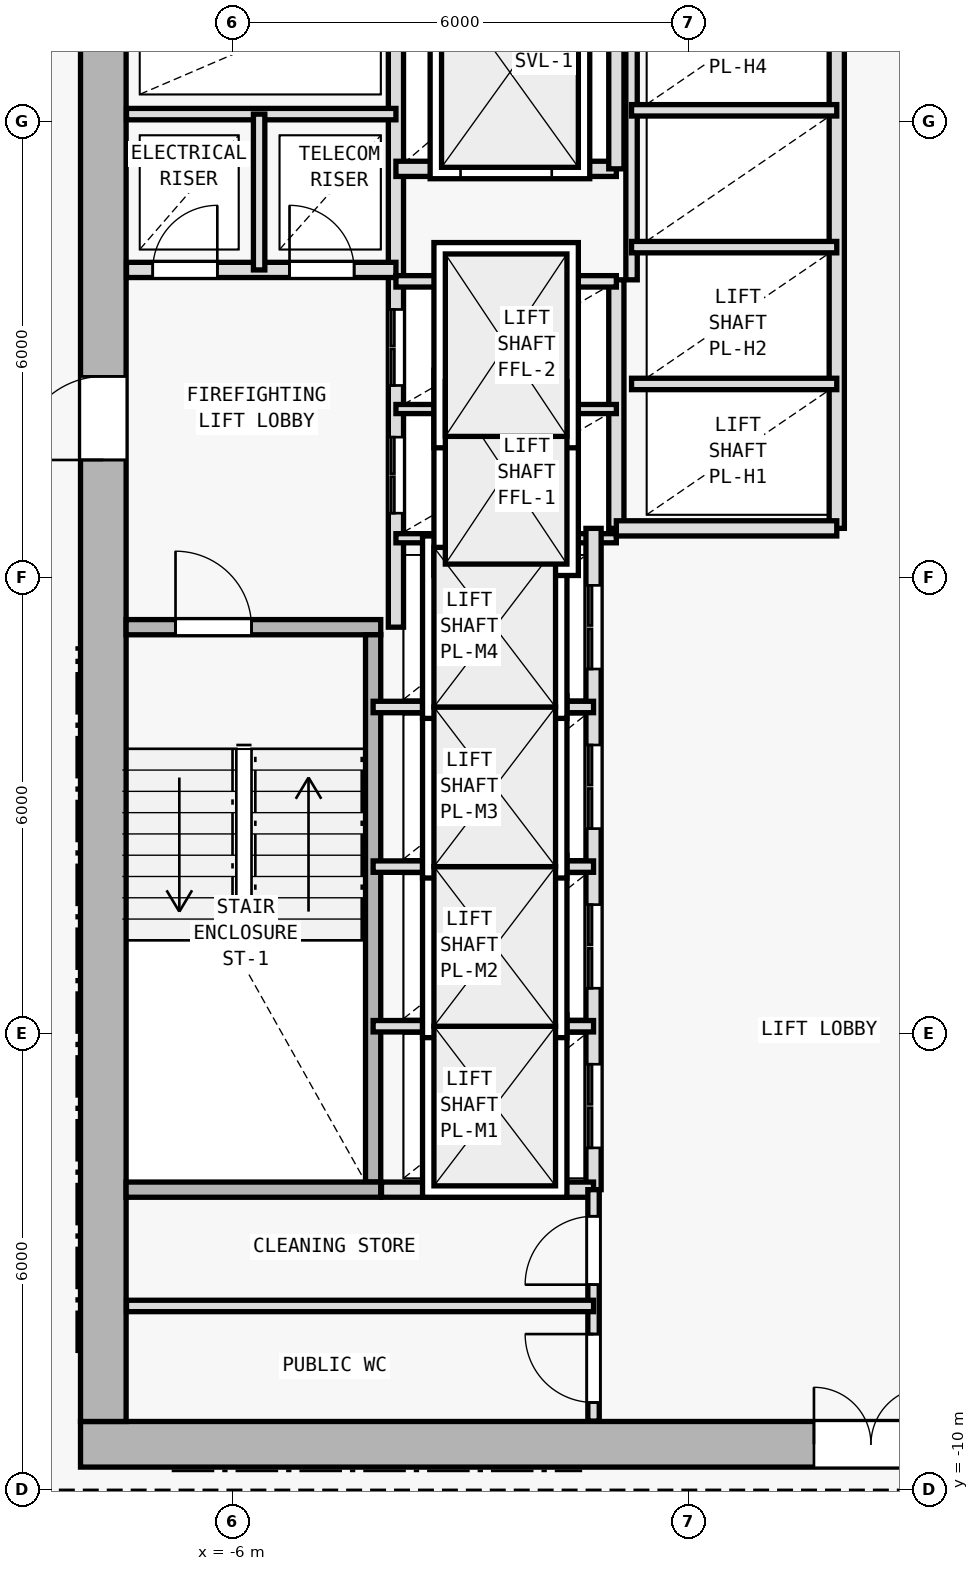
"""IFC4 building model, lengths in metres.
Left out: names, types, materials, properties, quantities, classifications, styles, units other than length and angle.
Written with IfcOpenShell. Run it as: python <this file> out.ifc"""

import sys

from ifc_helpers import new_model, si_unit, direction, frame, frame_2d, origin, origin_2d, place, context, subcontext, project, spatial, rectangle, i_section, extrude, element, fill, save


model = new_model("IFC4")
c1 = context("Model", 3, precision=1e-05, world=origin(), true_north=direction((0.0, 1.0)))
c2 = subcontext(c1, "Body", "Model", "MODEL_VIEW")
j1 = project(units=[si_unit("LENGTHUNIT", "METRE"), si_unit("PLANEANGLEUNIT", "RADIAN")], contexts=[c1])
p1 = place(None, origin())
s1 = spatial("IfcSite", under=j1, at=p1, CompositionType="ELEMENT")
p2 = place(p1, origin())
s2 = spatial("IfcBuilding", under=s1, at=p2, CompositionType="ELEMENT")
p3 = place(p2, frame((0.0, 0.0, 118.5)))
s3 = spatial("IfcBuildingStorey", under=s2, at=p3, CompositionType="ELEMENT", Elevation=118.5)
for number, where, z_axis, x_axis in (
    (1, (-7.7, -9.4, 0.0), (0.0, 0.0, 1.0), (1.0, 0.0, 0.0)),
    (2, (0.0, -9.4, 0.0), (0.0, 0.0, 1.0), (1.0, 0.0, 0.0)),
    (3, (-7.7, 2.0, 0.0), (0.0, 0.0, 1.0), (1.0, 0.0, 0.0)),
):
    element("IfcColumn", number, at=place(p3, frame(where, z_axis=z_axis, x_axis=x_axis)), inside=s3, PredefinedType="COLUMN", context=c2, shape_type="SweptSolid", body=[
        extrude(i_section(OverallWidth=0.409, OverallDepth=0.425, WebThickness=0.021, FlangeThickness=0.034, FilletRadius=0.015, at=origin_2d()), origin(), (0.0, 0.0, 1.0), 3.6),
    ])
p4 = place(p3, frame((-8.0, -9.4, 0.0), z_axis=(0.0, 0.0, 1.0), x_axis=(1.0, 0.0, 0.0)))
e4 = element("IfcWall", 4, at=p4, inside=s3, PredefinedType="SHEAR", context=c2, shape_type="SweptSolid", body=[
    extrude(rectangle(XDim=16.0, YDim=0.6, at=frame_2d((8.0, 0.0))), origin(), (0.0, 0.0, 1.0), 3.35),
])
p5 = place(p4, frame((9.65, 0.0, 0.0)))
e5 = element("IfcOpeningElement", 5, at=p5, cuts=e4, PredefinedType="OPENING", context=c2, shape_type="SweptSolid", body=[
    extrude(rectangle(XDim=1.5, YDim=2.2, at=frame_2d((0.75, 1.1))), frame((0.0, 0.31, 0.0), z_axis=(0.0, -1.0, 0.0), x_axis=(1.0, 0.0, 0.0)), (0.0, 0.0, 1.0), 0.62),
])
p6 = place(p3, frame((-7.7, -9.1, 0.0), z_axis=(0.0, 0.0, 1.0), x_axis=(0.0, 1.0, 0.0)))
e6 = element("IfcWall", 6, at=p6, inside=s3, PredefinedType="SHEAR", context=c2, shape_type="SweptSolid", body=[
    extrude(rectangle(XDim=19.0, YDim=0.6, at=frame_2d((9.5, 0.0))), origin(), (0.0, 0.0, 1.0), 3.35),
])
p7 = place(p6, frame((12.65, 0.0, 0.0)))
e7 = element("IfcOpeningElement", 7, at=p7, cuts=e6, PredefinedType="OPENING", context=c2, shape_type="SweptSolid", body=[
    extrude(rectangle(XDim=1.1, YDim=2.15, at=frame_2d((0.55, 1.075))), frame((0.0, 0.31, 0.0), z_axis=(0.0, -1.0, 0.0), x_axis=(1.0, 0.0, 0.0)), (0.0, 0.0, 1.0), 0.62),
])
p8 = place(p3, frame((-7.4, 1.35, 0.0), z_axis=(0.0, 0.0, 1.0), x_axis=(1.0, 0.0, 0.0)))
e8 = element("IfcWall", 8, at=p8, inside=s3, PredefinedType="SOLIDWALL", context=c2, shape_type="SweptSolid", body=[
    extrude(rectangle(XDim=3.35, YDim=0.2, at=frame_2d((1.675, 0.0))), origin(), (0.0, 0.0, 1.0), 3.35),
])
p9 = place(p8, frame((0.65, 0.0, 0.0)))
e9 = element("IfcOpeningElement", 9, at=p9, cuts=e8, PredefinedType="OPENING", context=c2, shape_type="SweptSolid", body=[
    extrude(rectangle(XDim=1.0, YDim=2.15, at=frame_2d((0.5, 1.075))), frame((0.0, 0.11, 0.0), z_axis=(0.0, -1.0, 0.0), x_axis=(1.0, 0.0, 0.0)), (0.0, 0.0, 1.0), 0.22),
])
p10 = place(p3, frame((-4.15, -5.95, 0.0), z_axis=(0.0, 0.0, 1.0), x_axis=(0.0, 1.0, 0.0)))
e10 = element("IfcWall", 10, at=p10, inside=s3, PredefinedType="SOLIDWALL", context=c2, shape_type="SweptSolid", body=[
    extrude(rectangle(XDim=7.2, YDim=0.2, at=frame_2d((3.6, 0.0))), origin(), (0.0, 0.0, 1.0), 3.35),
])
p11 = place(p3, frame((-3.85, 1.35, 0.0), z_axis=(0.0, 0.0, 1.0), x_axis=(0.0, 1.0, 0.0)))
e11 = element("IfcWall", 11, at=p11, inside=s3, PredefinedType="SOLIDWALL", context=c2, shape_type="SweptSolid", body=[
    extrude(rectangle(XDim=8.545, YDim=0.2, at=frame_2d((4.272, 0.0))), origin(), (0.0, 0.0, 1.0), 3.35),
])
p12 = place(p11, frame((1.5, 0.0, 0.0)))
e12 = element("IfcOpeningElement", 12, at=p12, cuts=e11, PredefinedType="OPENING", context=c2, shape_type="SweptSolid", body=[
    extrude(rectangle(XDim=1.0, YDim=2.15, at=frame_2d((0.5, 1.075))), frame((0.0, 0.11, 0.0), z_axis=(0.0, -1.0, 0.0), x_axis=(1.0, 0.0, 0.0)), (0.0, 0.0, 1.0), 0.22),
])
p13 = place(p11, frame((3.18, 0.0, 0.0)))
e13 = element("IfcOpeningElement", 13, at=p13, cuts=e11, PredefinedType="OPENING", context=c2, shape_type="SweptSolid", body=[
    extrude(rectangle(XDim=1.0, YDim=2.15, at=frame_2d((0.5, 1.075))), frame((0.0, 0.11, 0.0), z_axis=(0.0, -1.0, 0.0), x_axis=(1.0, 0.0, 0.0)), (0.0, 0.0, 1.0), 0.22),
])
p14 = place(p3, frame((-7.395, 6.05, 0.0), z_axis=(0.0, 0.0, 1.0), x_axis=(1.0, 0.0, 0.0)))
e14 = element("IfcWall", 14, at=p14, inside=s3, PredefinedType="SOLIDWALL", context=c2, shape_type="SweptSolid", body=[
    extrude(rectangle(XDim=3.545, YDim=0.2, at=frame_2d((1.772, 0.0))), origin(), (0.0, 0.0, 1.0), 3.35),
])
p15 = place(p14, frame((0.345, 0.0, 0.0)))
e15 = element("IfcOpeningElement", 15, at=p15, cuts=e14, PredefinedType="OPENING", context=c2, shape_type="SweptSolid", body=[
    extrude(rectangle(XDim=0.85, YDim=2.1, at=frame_2d((0.425, 1.05))), frame((0.0, 0.11, 0.0), z_axis=(0.0, -1.0, 0.0), x_axis=(1.0, 0.0, 0.0)), (0.0, 0.0, 1.0), 0.22),
])
p16 = place(p14, frame((2.145, 0.0, 0.0)))
e16 = element("IfcOpeningElement", 16, at=p16, cuts=e14, PredefinedType="OPENING", context=c2, shape_type="SweptSolid", body=[
    extrude(rectangle(XDim=0.85, YDim=2.1, at=frame_2d((0.425, 1.05))), frame((0.0, 0.11, 0.0), z_axis=(0.0, -1.0, 0.0), x_axis=(1.0, 0.0, 0.0)), (0.0, 0.0, 1.0), 0.22),
])
p17 = place(p3, frame((-7.395, 8.1, 0.0), z_axis=(0.0, 0.0, 1.0), x_axis=(1.0, 0.0, 0.0)))
e17 = element("IfcWall", 17, at=p17, inside=s3, PredefinedType="PARTITIONING", context=c2, shape_type="SweptSolid", body=[
    extrude(rectangle(XDim=3.545, YDim=0.15, at=frame_2d((1.772, 0.0))), origin(), (0.0, 0.0, 1.0), 3.35),
])
p18 = place(p3, frame((-5.65, 6.05, 0.0), z_axis=(0.0, 0.0, 1.0), x_axis=(0.0, 1.0, 0.0)))
e18 = element("IfcWall", 18, at=p18, inside=s3, PredefinedType="PARTITIONING", context=c2, shape_type="SweptSolid", body=[
    extrude(rectangle(XDim=2.05, YDim=0.15, at=frame_2d((1.025, 0.0))), origin(), (0.0, 0.0, 1.0), 3.35),
])
p19 = place(p3, frame((-0.95, 2.65, 0.0), z_axis=(0.0, 0.0, 1.0), x_axis=(0.0, 1.0, 0.0)))
e19 = element("IfcWall", 19, at=p19, inside=s3, PredefinedType="SOLIDWALL", context=c2, shape_type="SweptSolid", body=[
    extrude(rectangle(XDim=3.27, YDim=0.2, at=frame_2d((1.635, 0.0))), origin(), (0.0, 0.0, 1.0), 3.35),
])
for number, where, z_axis, x_axis in (
    (20, (-3.85, 2.52, 0.0), (0.0, 0.0, 1.0), (1.0, 0.0, 0.0)),
    (21, (-3.85, 4.22, 0.0), (0.0, 0.0, 1.0), (1.0, 0.0, 0.0)),
):
    element("IfcWall", number, at=place(p3, frame(where, z_axis=z_axis, x_axis=x_axis)), inside=s3, PredefinedType="PARTITIONING", context=c2, shape_type="SweptSolid", body=[
        extrude(rectangle(XDim=2.9, YDim=0.12, at=frame_2d((1.45, 0.0))), origin(), (0.0, 0.0, 1.0), 3.35),
    ])
p20 = place(p3, frame((-3.85, 5.9, 0.0), z_axis=(0.0, 0.0, 1.0), x_axis=(1.0, 0.0, 0.0)))
e22 = element("IfcWall", 22, at=p20, inside=s3, PredefinedType="PARTITIONING", context=c2, shape_type="SweptSolid", body=[
    extrude(rectangle(XDim=2.9, YDim=0.15, at=frame_2d((1.45, 0.0))), origin(), (0.0, 0.0, 1.0), 3.35),
])
p21 = place(p3, frame((-3.85, 7.38, 0.0), z_axis=(0.0, 0.0, 1.0), x_axis=(1.0, 0.0, 0.0)))
e23 = element("IfcWall", 23, at=p21, inside=s3, PredefinedType="SOLIDWALL", context=c2, shape_type="SweptSolid", body=[
    extrude(rectangle(XDim=2.9, YDim=0.2, at=frame_2d((1.45, 0.0))), origin(), (0.0, 0.0, 1.0), 3.35),
])
p22 = place(p21, frame((0.85, 0.0, 0.0)))
e24 = element("IfcOpeningElement", 24, at=p22, cuts=e23, PredefinedType="OPENING", context=c2, shape_type="SweptSolid", body=[
    extrude(rectangle(XDim=1.2, YDim=2.2, at=frame_2d((0.6, 1.1))), frame((0.0, 0.11, 0.0), z_axis=(0.0, -1.0, 0.0), x_axis=(1.0, 0.0, 0.0)), (0.0, 0.0, 1.0), 0.22),
])
p23 = place(p3, frame((-0.95, 7.38, 0.0), z_axis=(0.0, 0.0, 1.0), x_axis=(0.0, 1.0, 0.0)))
e25 = element("IfcWall", 25, at=p23, inside=s3, PredefinedType="SOLIDWALL", context=c2, shape_type="SweptSolid", body=[
    extrude(rectangle(XDim=2.515, YDim=0.2, at=frame_2d((1.258, 0.0))), origin(), (0.0, 0.0, 1.0), 3.35),
])
p24 = place(p3, frame((-1.25, -6.05, 0.0), z_axis=(0.0, 0.0, 1.0), x_axis=(0.0, 1.0, 0.0)))
e26 = element("IfcWall", 26, at=p24, inside=s3, PredefinedType="SOLIDWALL", context=c2, shape_type="SweptSolid", body=[
    extrude(rectangle(XDim=8.7, YDim=0.2, at=frame_2d((4.35, 0.0))), origin(), (0.0, 0.0, 1.0), 3.35),
])
p25 = place(p24, frame((0.55, 0.0, 0.0)))
e27 = element("IfcOpeningElement", 27, at=p25, cuts=e26, PredefinedType="OPENING", context=c2, shape_type="SweptSolid", body=[
    extrude(rectangle(XDim=1.1, YDim=2.15, at=frame_2d((0.55, 1.075))), frame((0.0, 0.11, 0.0), z_axis=(0.0, -1.0, 0.0), x_axis=(1.0, 0.0, 0.0)), (0.0, 0.0, 1.0), 0.22),
])
p26 = place(p24, frame((2.65, 0.0, 0.0)))
e28 = element("IfcOpeningElement", 28, at=p26, cuts=e26, PredefinedType="OPENING", context=c2, shape_type="SweptSolid", body=[
    extrude(rectangle(XDim=1.1, YDim=2.15, at=frame_2d((0.55, 1.075))), frame((0.0, 0.11, 0.0), z_axis=(0.0, -1.0, 0.0), x_axis=(1.0, 0.0, 0.0)), (0.0, 0.0, 1.0), 0.22),
])
p27 = place(p24, frame((4.75, 0.0, 0.0)))
e29 = element("IfcOpeningElement", 29, at=p27, cuts=e26, PredefinedType="OPENING", context=c2, shape_type="SweptSolid", body=[
    extrude(rectangle(XDim=1.1, YDim=2.15, at=frame_2d((0.55, 1.075))), frame((0.0, 0.11, 0.0), z_axis=(0.0, -1.0, 0.0), x_axis=(1.0, 0.0, 0.0)), (0.0, 0.0, 1.0), 0.22),
])
p28 = place(p24, frame((6.85, 0.0, 0.0)))
e30 = element("IfcOpeningElement", 30, at=p28, cuts=e26, PredefinedType="OPENING", context=c2, shape_type="SweptSolid", body=[
    extrude(rectangle(XDim=1.1, YDim=2.15, at=frame_2d((0.55, 1.075))), frame((0.0, 0.11, 0.0), z_axis=(0.0, -1.0, 0.0), x_axis=(1.0, 0.0, 0.0)), (0.0, 0.0, 1.0), 0.22),
])
for number, where, z_axis, x_axis in (
    (31, (-4.15, -3.9, 0.0), (0.0, 0.0, 1.0), (1.0, 0.0, 0.0)),
    (32, (-4.15, -1.8, 0.0), (0.0, 0.0, 1.0), (1.0, 0.0, 0.0)),
    (33, (-4.15, 0.3, 0.0), (0.0, 0.0, 1.0), (1.0, 0.0, 0.0)),
):
    element("IfcWall", number, at=place(p3, frame(where, z_axis=z_axis, x_axis=x_axis)), inside=s3, PredefinedType="PARTITIONING", context=c2, shape_type="SweptSolid", body=[
        extrude(rectangle(XDim=2.9, YDim=0.15, at=frame_2d((1.45, 0.0))), origin(), (0.0, 0.0, 1.0), 3.35),
    ])
p29 = place(p3, frame((1.95, 2.65, 0.0), z_axis=(0.0, 0.0, 1.0), x_axis=(0.0, 1.0, 0.0)))
e34 = element("IfcWall", 34, at=p29, inside=s3, PredefinedType="SOLIDWALL", context=c2, shape_type="SweptSolid", body=[
    extrude(rectangle(XDim=7.245, YDim=0.2, at=frame_2d((3.623, 0.0))), origin(), (0.0, 0.0, 1.0), 3.35),
])
p30 = place(p3, frame((-0.95, 2.65, 0.0), z_axis=(0.0, 0.0, 1.0), x_axis=(1.0, 0.0, 0.0)))
e35 = element("IfcWall", 35, at=p30, inside=s3, PredefinedType="SOLIDWALL", context=c2, shape_type="SweptSolid", body=[
    extrude(rectangle(XDim=2.9, YDim=0.2, at=frame_2d((1.45, 0.0))), origin(), (0.0, 0.0, 1.0), 3.35),
])
p31 = place(p3, frame((-0.75, 5.92, 0.0), z_axis=(0.0, 0.0, 1.0), x_axis=(0.0, 1.0, 0.0)))
e36 = element("IfcWall", 36, at=p31, inside=s3, PredefinedType="PARTITIONING", context=c2, shape_type="SweptSolid", body=[
    extrude(rectangle(XDim=3.975, YDim=0.15, at=frame_2d((1.988, 0.0))), origin(), (0.0, 0.0, 1.0), 3.35),
])
for number, where, z_axis, x_axis in (
    (37, (-0.75, 4.55, 0.0), (0.0, 0.0, 1.0), (1.0, 0.0, 0.0)),
    (38, (-0.75, 6.35, 0.0), (0.0, 0.0, 1.0), (1.0, 0.0, 0.0)),
    (39, (-0.75, 8.15, 0.0), (0.0, 0.0, 1.0), (1.0, 0.0, 0.0)),
):
    element("IfcWall", number, at=place(p3, frame(where, z_axis=z_axis, x_axis=x_axis)), inside=s3, PredefinedType="PARTITIONING", context=c2, shape_type="SweptSolid", body=[
        extrude(rectangle(XDim=2.7, YDim=0.15, at=frame_2d((1.35, 0.0))), origin(), (0.0, 0.0, 1.0), 3.35),
    ])
p32 = place(p3, frame((-7.4, -6.05, 0.0), z_axis=(0.0, 0.0, 1.0), x_axis=(1.0, 0.0, 0.0)))
e40 = element("IfcWall", 40, at=p32, inside=s3, PredefinedType="SOLIDWALL", context=c2, shape_type="SweptSolid", body=[
    extrude(rectangle(XDim=3.35, YDim=0.2, at=frame_2d((1.675, 0.0))), origin(), (0.0, 0.0, 1.0), 3.35),
])
p33 = place(p3, frame((-4.04, -6.05, 0.0), z_axis=(0.0, 0.0, 1.0), x_axis=(1.0, 0.0, 0.0)))
e41 = element("IfcWall", 41, at=p33, inside=s3, PredefinedType="SOLIDWALL", context=c2, shape_type="SweptSolid", body=[
    extrude(rectangle(XDim=2.79, YDim=0.2, at=frame_2d((1.395, 0.0))), origin(), (0.0, 0.0, 1.0), 3.35),
])
p34 = place(p3, frame((-1.25, -9.095, 0.0), z_axis=(0.0, 0.0, 1.0), x_axis=(0.0, 1.0, 0.0)))
e42 = element("IfcWall", 42, at=p34, inside=s3, PredefinedType="PARTITIONING", context=c2, shape_type="SweptSolid", body=[
    extrude(rectangle(XDim=3.045, YDim=0.15, at=frame_2d((1.522, 0.0))), origin(), (0.0, 0.0, 1.0), 3.35),
])
p35 = place(p34, frame((1.795, 0.0, 0.0)))
e43 = element("IfcOpeningElement", 43, at=p35, cuts=e42, PredefinedType="OPENING", context=c2, shape_type="SweptSolid", body=[
    extrude(rectangle(XDim=0.9, YDim=2.1, at=frame_2d((0.45, 1.05))), frame((0.0, 0.085, 0.0), z_axis=(0.0, -1.0, 0.0), x_axis=(1.0, 0.0, 0.0)), (0.0, 0.0, 1.0), 0.17),
])
p36 = place(p34, frame((0.245, 0.0, 0.0)))
e44 = element("IfcOpeningElement", 44, at=p36, cuts=e42, PredefinedType="OPENING", context=c2, shape_type="SweptSolid", body=[
    extrude(rectangle(XDim=0.9, YDim=2.1, at=frame_2d((0.45, 1.05))), frame((0.0, 0.085, 0.0), z_axis=(0.0, -1.0, 0.0), x_axis=(1.0, 0.0, 0.0)), (0.0, 0.0, 1.0), 0.17),
])
p37 = place(p3, frame((-7.395, -7.58, 0.0), z_axis=(0.0, 0.0, 1.0), x_axis=(1.0, 0.0, 0.0)))
e45 = element("IfcWall", 45, at=p37, inside=s3, PredefinedType="PARTITIONING", context=c2, shape_type="SweptSolid", body=[
    extrude(rectangle(XDim=6.145, YDim=0.15, at=frame_2d((3.073, 0.0))), origin(), (0.0, 0.0, 1.0), 3.35),
])
p38 = place(p3, frame((-9.86, 8.426, 0.0), z_axis=(0.0, 0.0, 1.0), x_axis=(0.582449511476, 0.812866881218, 0.0)))
e46 = element("IfcWall", 46, at=p38, inside=s3, PredefinedType="PARTITIONING", context=c2, shape_type="SweptSolid", body=[
    extrude(rectangle(XDim=4.84, YDim=0.15, at=frame_2d((2.42, 0.0))), origin(), (0.0, 0.0, 1.0), 2.925),
])
p39 = place(p5, origin())
e47 = element("IfcDoor", 47, at=p39, inside=s3, OperationType="DOUBLE_DOOR_SINGLE_SWING", PredefinedType="DOOR", context=c2, shape_type="SweptSolid", body=[
    extrude(rectangle(XDim=1.5, YDim=2.2, at=frame_2d((0.75, 1.1))), frame((0.0, 0.025, 0.0), z_axis=(0.0, -1.0, 0.0), x_axis=(1.0, 0.0, 0.0)), (0.0, 0.0, 1.0), 0.05),
])
fill(e5, e47)
p40 = place(p7, origin())
e48 = element("IfcDoor", 48, at=p40, inside=s3, OperationType="SINGLE_SWING_LEFT", PredefinedType="DOOR", context=c2, shape_type="SweptSolid", body=[
    extrude(rectangle(XDim=1.1, YDim=2.15, at=frame_2d((0.55, 1.075))), frame((0.0, 0.025, 0.0), z_axis=(0.0, -1.0, 0.0), x_axis=(1.0, 0.0, 0.0)), (0.0, 0.0, 1.0), 0.05),
])
fill(e7, e48)
p41 = place(p9, origin())
e49 = element("IfcDoor", 49, at=p41, inside=s3, OperationType="SINGLE_SWING_LEFT", PredefinedType="DOOR", context=c2, shape_type="SweptSolid", body=[
    extrude(rectangle(XDim=1.0, YDim=2.15, at=frame_2d((0.5, 1.075))), frame((0.0, 0.025, 0.0), z_axis=(0.0, -1.0, 0.0), x_axis=(1.0, 0.0, 0.0)), (0.0, 0.0, 1.0), 0.05),
])
fill(e9, e49)
p42 = place(p15, origin())
e50 = element("IfcDoor", 50, at=p42, inside=s3, OperationType="SINGLE_SWING_RIGHT", PredefinedType="DOOR", context=c2, shape_type="SweptSolid", body=[
    extrude(rectangle(XDim=0.85, YDim=2.1, at=frame_2d((0.425, 1.05))), frame((0.0, 0.025, 0.0), z_axis=(0.0, -1.0, 0.0), x_axis=(1.0, 0.0, 0.0)), (0.0, 0.0, 1.0), 0.05),
])
fill(e15, e50)
p43 = place(p16, origin())
e51 = element("IfcDoor", 51, at=p43, inside=s3, OperationType="SINGLE_SWING_LEFT", PredefinedType="DOOR", context=c2, shape_type="SweptSolid", body=[
    extrude(rectangle(XDim=0.85, YDim=2.1, at=frame_2d((0.425, 1.05))), frame((0.0, 0.025, 0.0), z_axis=(0.0, -1.0, 0.0), x_axis=(1.0, 0.0, 0.0)), (0.0, 0.0, 1.0), 0.05),
])
fill(e16, e51)
p44 = place(p22, origin())
e52 = element("IfcDoor", 52, at=p44, inside=s3, OperationType="DOUBLE_DOOR_SLIDING", PredefinedType="DOOR", context=c2, shape_type="SweptSolid", body=[
    extrude(rectangle(XDim=1.2, YDim=2.2, at=frame_2d((0.6, 1.1))), frame((0.0, 0.025, 0.0), z_axis=(0.0, -1.0, 0.0), x_axis=(1.0, 0.0, 0.0)), (0.0, 0.0, 1.0), 0.05),
])
fill(e24, e52)
p45 = place(p25, origin())
e53 = element("IfcDoor", 53, at=p45, inside=s3, OperationType="DOUBLE_DOOR_SLIDING", PredefinedType="DOOR", context=c2, shape_type="SweptSolid", body=[
    extrude(rectangle(XDim=1.1, YDim=2.15, at=frame_2d((0.55, 1.075))), frame((0.0, 0.025, 0.0), z_axis=(0.0, -1.0, 0.0), x_axis=(1.0, 0.0, 0.0)), (0.0, 0.0, 1.0), 0.05),
])
fill(e27, e53)
p46 = place(p26, origin())
e54 = element("IfcDoor", 54, at=p46, inside=s3, OperationType="DOUBLE_DOOR_SLIDING", PredefinedType="DOOR", context=c2, shape_type="SweptSolid", body=[
    extrude(rectangle(XDim=1.1, YDim=2.15, at=frame_2d((0.55, 1.075))), frame((0.0, 0.025, 0.0), z_axis=(0.0, -1.0, 0.0), x_axis=(1.0, 0.0, 0.0)), (0.0, 0.0, 1.0), 0.05),
])
fill(e28, e54)
p47 = place(p27, origin())
e55 = element("IfcDoor", 55, at=p47, inside=s3, OperationType="DOUBLE_DOOR_SLIDING", PredefinedType="DOOR", context=c2, shape_type="SweptSolid", body=[
    extrude(rectangle(XDim=1.1, YDim=2.15, at=frame_2d((0.55, 1.075))), frame((0.0, 0.025, 0.0), z_axis=(0.0, -1.0, 0.0), x_axis=(1.0, 0.0, 0.0)), (0.0, 0.0, 1.0), 0.05),
])
fill(e29, e55)
p48 = place(p28, origin())
e56 = element("IfcDoor", 56, at=p48, inside=s3, OperationType="DOUBLE_DOOR_SLIDING", PredefinedType="DOOR", context=c2, shape_type="SweptSolid", body=[
    extrude(rectangle(XDim=1.1, YDim=2.15, at=frame_2d((0.55, 1.075))), frame((0.0, 0.025, 0.0), z_axis=(0.0, -1.0, 0.0), x_axis=(1.0, 0.0, 0.0)), (0.0, 0.0, 1.0), 0.05),
])
fill(e30, e56)
p49 = place(p12, origin())
e57 = element("IfcDoor", 57, at=p49, inside=s3, OperationType="DOUBLE_DOOR_SLIDING", PredefinedType="DOOR", context=c2, shape_type="SweptSolid", body=[
    extrude(rectangle(XDim=1.0, YDim=2.15, at=frame_2d((0.5, 1.075))), frame((0.0, 0.025, 0.0), z_axis=(0.0, -1.0, 0.0), x_axis=(1.0, 0.0, 0.0)), (0.0, 0.0, 1.0), 0.05),
])
fill(e12, e57)
p50 = place(p13, origin())
e58 = element("IfcDoor", 58, at=p50, inside=s3, OperationType="DOUBLE_DOOR_SLIDING", PredefinedType="DOOR", context=c2, shape_type="SweptSolid", body=[
    extrude(rectangle(XDim=1.0, YDim=2.15, at=frame_2d((0.5, 1.075))), frame((0.0, 0.025, 0.0), z_axis=(0.0, -1.0, 0.0), x_axis=(1.0, 0.0, 0.0)), (0.0, 0.0, 1.0), 0.05),
])
fill(e13, e58)
p51 = place(p35, origin())
e59 = element("IfcDoor", 59, at=p51, inside=s3, OperationType="SINGLE_SWING_LEFT", PredefinedType="DOOR", context=c2, shape_type="SweptSolid", body=[
    extrude(rectangle(XDim=0.9, YDim=2.1, at=frame_2d((0.45, 1.05))), frame((0.0, 0.025, 0.0), z_axis=(0.0, -1.0, 0.0), x_axis=(1.0, 0.0, 0.0)), (0.0, 0.0, 1.0), 0.05),
])
fill(e43, e59)
p52 = place(p36, origin())
e60 = element("IfcDoor", 60, at=p52, inside=s3, OperationType="SINGLE_SWING_RIGHT", PredefinedType="DOOR", context=c2, shape_type="SweptSolid", body=[
    extrude(rectangle(XDim=0.9, YDim=2.1, at=frame_2d((0.45, 1.05))), frame((0.0, 0.025, 0.0), z_axis=(0.0, -1.0, 0.0), x_axis=(1.0, 0.0, 0.0)), (0.0, 0.0, 1.0), 0.05),
])
fill(e44, e60)
save(model, sys.argv[1])
